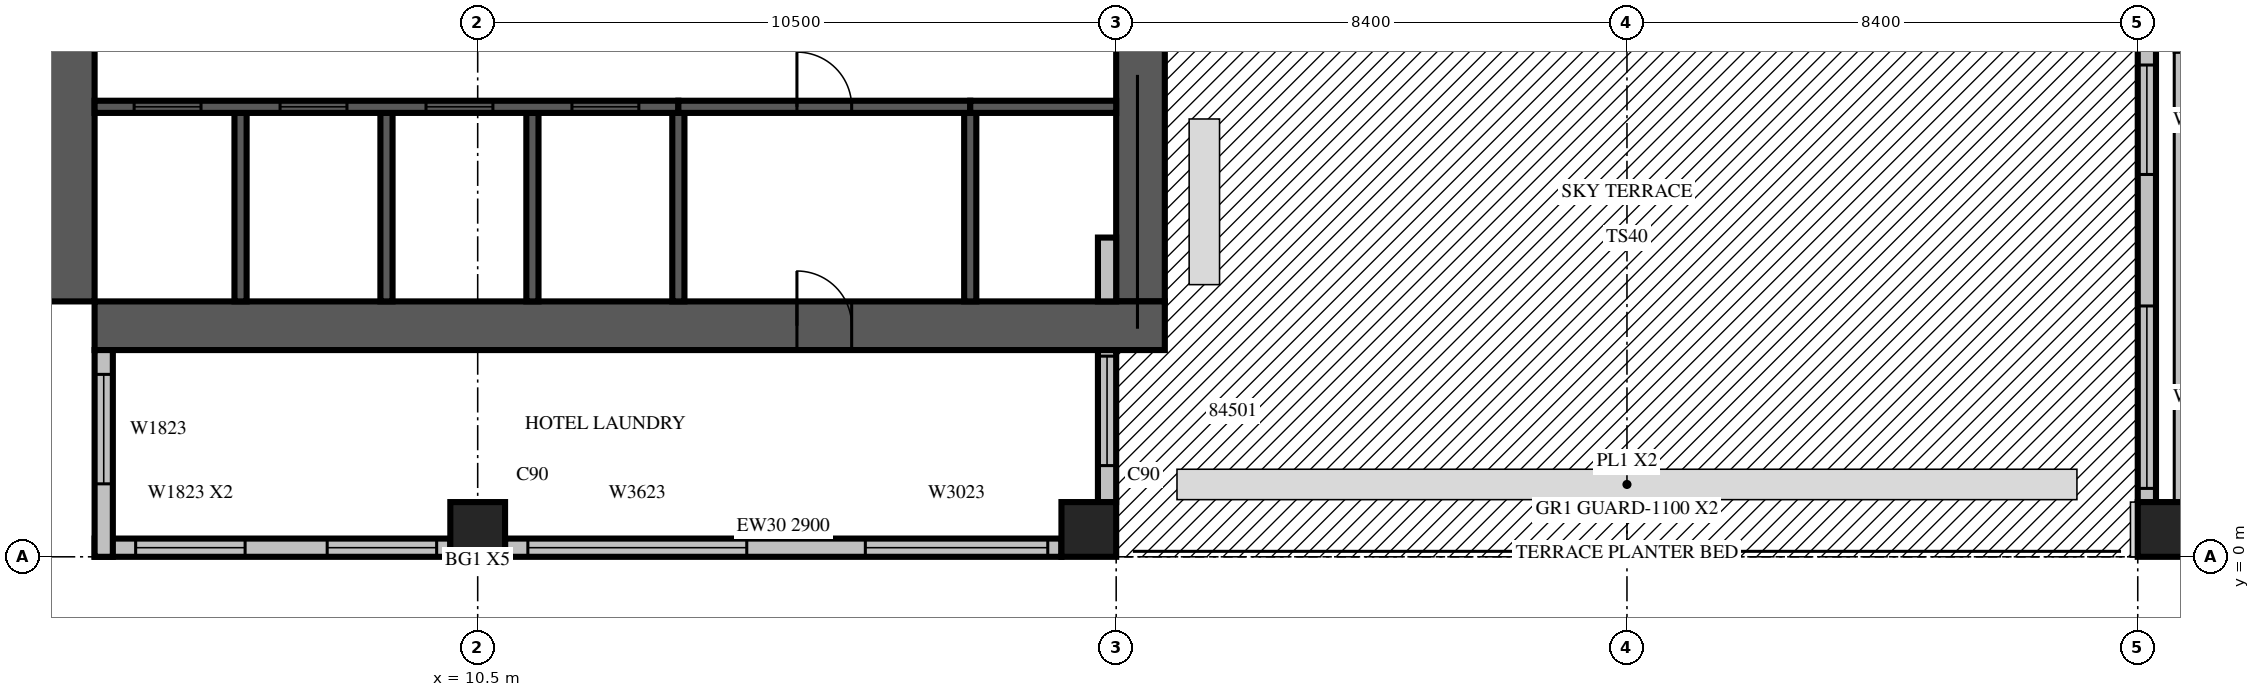
"""IFC4 building model, lengths in metres.
Left out: names, types, materials, properties, quantities, classifications, styles, units other than length and angle.
Written with IfcOpenShell. Run it as: python <this file> out.ifc"""

import sys

from ifc_helpers import new_model, si_unit, direction, frame, frame_2d, origin, origin_2d, place, context, subcontext, project, spatial, rectangle, extrude, source, transform, mapped, element, fill, save


model = new_model("IFC4")
c1 = context("Model", 3, precision=1e-05, world=origin(), true_north=direction((0.0, 1.0)))
c2 = subcontext(c1, "Body", "Model", "MODEL_VIEW")
j1 = project(units=[si_unit("LENGTHUNIT", "METRE"), si_unit("PLANEANGLEUNIT", "RADIAN")], contexts=[c1])
p1 = place(None, origin())
s1 = spatial("IfcSite", under=j1, at=p1, CompositionType="ELEMENT")
p2 = place(p1, origin())
s2 = spatial("IfcBuilding", under=s1, at=p2, CompositionType="ELEMENT")
p3 = place(p2, frame((0.0, 0.0, 204.4)))
s3 = spatial("IfcBuildingStorey", under=s2, at=p3, CompositionType="ELEMENT", Elevation=204.4)
m1 = source(origin(), c2, "Body", "SweptSolid", [
    extrude(rectangle(XDim=0.9, YDim=0.9, at=origin_2d()), origin(), (0.0, 0.0, 1.0), 3.8),
])
for number, where, z_axis, x_axis in (
    (1, (10.5, 0.45, 0.0), (0.0, 0.0, 1.0), (1.0, 0.0, 0.0)),
    (2, (20.55, 0.45, 0.0), (0.0, 0.0, 1.0), (1.0, 0.0, 0.0)),
    (3, (38.25, 0.45, 0.0), (0.0, 0.0, 1.0), (1.0, 0.0, 0.0)),
):
    element("IfcColumn", number, at=place(p3, frame(where, z_axis=z_axis, x_axis=x_axis)), inside=s3, PredefinedType="COLUMN", context=c2, shape_type="MappedRepresentation", body=[
        mapped(m1, transform((0.0, 0.0, 0.0), scale=1.0)),
    ])
m2 = source(origin(), c2, "Body", "SweptSolid", [
    extrude(rectangle(XDim=17.6, YDim=0.8, at=frame_2d((8.8, 0.0))), origin(), (0.0, 0.0, 1.0), 3.8),
])
p4 = place(p3, frame((3.8, 4.2, 0.0), z_axis=(0.0, 0.0, 1.0), x_axis=(0.0, 1.0, 0.0)))
e4 = element("IfcWall", 4, at=p4, inside=s3, PredefinedType="SHEAR", context=c2, shape_type="MappedRepresentation", body=[
    mapped(m2, transform((0.0, 0.0, 0.0), scale=1.0)),
])
m3 = source(origin(), c2, "Body", "SweptSolid", [
    extrude(rectangle(XDim=2.2, YDim=2.1, at=frame_2d((1.1, 1.05))), frame((0.0, 0.41, 0.0), z_axis=(0.0, -1.0, 0.0), x_axis=(1.0, 0.0, 0.0)), (0.0, 0.0, 1.0), 0.82),
])
p5 = place(p4, frame((4.2, 0.0, 0.0)))
e5 = element("IfcOpeningElement", 5, at=p5, cuts=e4, PredefinedType="OPENING", context=c2, shape_type="MappedRepresentation", body=[
    mapped(m3, transform((0.0, 0.0, 0.0), scale=1.0)),
])
m4 = source(origin(), c2, "Body", "SweptSolid", [
    extrude(rectangle(XDim=0.9, YDim=2.1, at=frame_2d((0.45, 1.05))), frame((0.0, 0.41, 0.0), z_axis=(0.0, -1.0, 0.0), x_axis=(1.0, 0.0, 0.0)), (0.0, 0.0, 1.0), 0.82),
])
p6 = place(p4, frame((10.95, 0.0, 0.0)))
e6 = element("IfcOpeningElement", 6, at=p6, cuts=e4, PredefinedType="OPENING", context=c2, shape_type="MappedRepresentation", body=[
    mapped(m4, transform((0.0, 0.0, 0.0), scale=1.0)),
])
m5 = source(origin(), c2, "Body", "SweptSolid", [
    extrude(rectangle(XDim=16.8, YDim=0.8, at=frame_2d((8.4, 0.0))), origin(), (0.0, 0.0, 1.0), 3.8),
])
p7 = place(p3, frame((21.4, 4.2, 0.0), z_axis=(0.0, 0.0, 1.0), x_axis=(0.0, 1.0, 0.0)))
e7 = element("IfcWall", 7, at=p7, inside=s3, PredefinedType="SHEAR", context=c2, shape_type="MappedRepresentation", body=[
    mapped(m5, transform((0.0, 0.0, 0.0), scale=1.0)),
])
p8 = place(p7, frame((4.2, 0.0, 0.0)))
e8 = element("IfcOpeningElement", 8, at=p8, cuts=e7, PredefinedType="OPENING", context=c2, shape_type="MappedRepresentation", body=[
    mapped(m3, transform((0.0, 0.0, 0.0), scale=1.0)),
])
m6 = source(origin(), c2, "Body", "SweptSolid", [
    extrude(rectangle(XDim=1.2, YDim=2.1, at=frame_2d((0.6, 1.05))), frame((0.0, 0.41, 0.0), z_axis=(0.0, -1.0, 0.0), x_axis=(1.0, 0.0, 0.0)), (0.0, 0.0, 1.0), 0.82),
])
p9 = place(p7, frame((14.7, 0.0, 0.0)))
e9 = element("IfcOpeningElement", 9, at=p9, cuts=e7, PredefinedType="OPENING", context=c2, shape_type="MappedRepresentation", body=[
    mapped(m6, transform((0.0, 0.0, 0.0), scale=1.0)),
])
p10 = place(p3, frame((4.2, 3.8, 0.0), z_axis=(0.0, 0.0, 1.0), x_axis=(1.0, 0.0, 0.0)))
e10 = element("IfcWall", 10, at=p10, inside=s3, PredefinedType="SHEAR", context=c2, shape_type="MappedRepresentation", body=[
    mapped(m2, transform((0.0, 0.0, 0.0), scale=1.0)),
])
p11 = place(p10, frame((11.55, 0.0, 0.0)))
e11 = element("IfcOpeningElement", 11, at=p11, cuts=e10, PredefinedType="OPENING", context=c2, shape_type="MappedRepresentation", body=[
    mapped(m4, transform((0.0, 0.0, 0.0), scale=1.0)),
])
m7 = source(origin(), c2, "Body", "SweptSolid", [
    extrude(rectangle(XDim=5.85, YDim=0.3, at=frame_2d((2.925, 0.0))), origin(), (0.0, 0.0, 1.0), 3.4),
])
p12 = place(p3, frame((4.2, 0.15, 0.0), z_axis=(0.0, 0.0, 1.0), x_axis=(1.0, 0.0, 0.0)))
e12 = element("IfcWall", 12, at=p12, inside=s3, PredefinedType="STANDARD", context=c2, shape_type="MappedRepresentation", body=[
    mapped(m7, transform((0.0, 0.0, 0.0), scale=1.0)),
])
m8 = source(origin(), c2, "Body", "SweptSolid", [
    extrude(rectangle(XDim=1.8, YDim=2.3, at=frame_2d((0.9, 1.15))), frame((0.0, 0.16, 0.0), z_axis=(0.0, -1.0, 0.0), x_axis=(1.0, 0.0, 0.0)), (0.0, 0.0, 1.0), 0.32),
])
p13 = place(p12, frame((0.675, 0.0, 0.6)))
e13 = element("IfcOpeningElement", 13, at=p13, cuts=e12, PredefinedType="OPENING", context=c2, shape_type="MappedRepresentation", body=[
    mapped(m8, transform((0.0, 0.0, 0.0), scale=1.0)),
])
p14 = place(p12, frame((3.825, 0.0, 0.6)))
e14 = element("IfcOpeningElement", 14, at=p14, cuts=e12, PredefinedType="OPENING", context=c2, shape_type="MappedRepresentation", body=[
    mapped(m8, transform((0.0, 0.0, 0.0), scale=1.0)),
])
p15 = place(p3, frame((10.95, 0.15, 0.0), z_axis=(0.0, 0.0, 1.0), x_axis=(1.0, 0.0, 0.0)))
e15 = element("IfcWall", 15, at=p15, inside=s3, PredefinedType="STANDARD", context=c2, shape_type="SweptSolid", body=[
    extrude(rectangle(XDim=9.15, YDim=0.3, at=frame_2d((4.575, 0.0))), origin(), (0.0, 0.0, 1.0), 2.9),
])
m9 = source(origin(), c2, "Body", "SweptSolid", [
    extrude(rectangle(XDim=3.6, YDim=2.3, at=frame_2d((1.8, 1.15))), frame((0.0, 0.16, 0.0), z_axis=(0.0, -1.0, 0.0), x_axis=(1.0, 0.0, 0.0)), (0.0, 0.0, 1.0), 0.32),
])
p16 = place(p15, frame((0.375, 0.0, 0.6)))
e16 = element("IfcOpeningElement", 16, at=p16, cuts=e15, PredefinedType="OPENING", context=c2, shape_type="MappedRepresentation", body=[
    mapped(m9, transform((0.0, 0.0, 0.0), scale=1.0)),
])
m10 = source(origin(), c2, "Body", "SweptSolid", [
    extrude(rectangle(XDim=3.0, YDim=2.3, at=frame_2d((1.5, 1.15))), frame((0.0, 0.16, 0.0), z_axis=(0.0, -1.0, 0.0), x_axis=(1.0, 0.0, 0.0)), (0.0, 0.0, 1.0), 0.32),
])
p17 = place(p15, frame((5.925, 0.0, 0.6)))
e17 = element("IfcOpeningElement", 17, at=p17, cuts=e15, PredefinedType="OPENING", context=c2, shape_type="MappedRepresentation", body=[
    mapped(m10, transform((0.0, 0.0, 0.0), scale=1.0)),
])
m11 = source(origin(), c2, "Body", "SweptSolid", [
    extrude(rectangle(XDim=2.5, YDim=0.3, at=frame_2d((1.25, 0.0))), origin(), (0.0, 0.0, 1.0), 3.4),
])
p18 = place(p3, frame((20.85, 0.9, 0.0), z_axis=(0.0, 0.0, 1.0), x_axis=(0.0, 1.0, 0.0)))
e18 = element("IfcWall", 18, at=p18, inside=s3, PredefinedType="STANDARD", context=c2, shape_type="MappedRepresentation", body=[
    mapped(m11, transform((0.0, 0.0, 0.0), scale=1.0)),
])
m12 = source(origin(), c2, "Body", "SweptSolid", [
    extrude(rectangle(XDim=1.8, YDim=2.4, at=frame_2d((0.9, 1.2))), frame((0.0, 0.16, 0.0), z_axis=(0.0, -1.0, 0.0), x_axis=(1.0, 0.0, 0.0)), (0.0, 0.0, 1.0), 0.32),
])
p19 = place(p18, frame((0.6, 0.0, 0.0)))
e19 = element("IfcOpeningElement", 19, at=p19, cuts=e18, PredefinedType="OPENING", context=c2, shape_type="MappedRepresentation", body=[
    mapped(m12, transform((0.0, 0.0, 0.0), scale=1.0)),
])
p20 = place(p3, frame((20.85, 4.2, 0.0), z_axis=(0.0, 0.0, 1.0), x_axis=(0.0, 1.0, 0.0)))
e20 = element("IfcWall", 20, at=p20, inside=s3, PredefinedType="STANDARD", context=c2, shape_type="SweptSolid", body=[
    extrude(rectangle(XDim=1.05, YDim=0.3, at=frame_2d((0.525, 0.0))), origin(), (0.0, 0.0, 1.0), 3.4),
])
m13 = source(origin(), c2, "Body", "SweptSolid", [
    extrude(rectangle(XDim=9.15, YDim=0.3, at=frame_2d((4.575, 0.0))), origin(), (0.0, 0.0, 1.0), 3.4),
])
p21 = place(p3, frame((37.95, 10.05, 0.0), z_axis=(0.0, 0.0, 1.0), x_axis=(0.0, -1.0, 0.0)))
e21 = element("IfcWall", 21, at=p21, inside=s3, PredefinedType="STANDARD", context=c2, shape_type="MappedRepresentation", body=[
    mapped(m13, transform((0.0, 0.0, 0.0), scale=1.0)),
])
p22 = place(p21, frame((1.962, 0.0, 0.6)))
e22 = element("IfcOpeningElement", 22, at=p22, cuts=e21, PredefinedType="OPENING", context=c2, shape_type="MappedRepresentation", body=[
    mapped(m8, transform((0.0, 0.0, 0.0), scale=1.0)),
])
p23 = place(p21, frame((5.925, 0.0, 0.6)))
e23 = element("IfcOpeningElement", 23, at=p23, cuts=e21, PredefinedType="OPENING", context=c2, shape_type="MappedRepresentation", body=[
    mapped(m10, transform((0.0, 0.0, 0.0), scale=1.0)),
])
m14 = source(origin(), c2, "Body", "SweptSolid", [
    extrude(rectangle(XDim=3.4, YDim=0.3, at=frame_2d((1.7, 0.0))), origin(), (0.0, 0.0, 1.0), 3.4),
])
p24 = place(p3, frame((4.35, 3.4, 0.0), z_axis=(0.0, 0.0, 1.0), x_axis=(0.0, -1.0, 0.0)))
e24 = element("IfcWall", 24, at=p24, inside=s3, PredefinedType="STANDARD", context=c2, shape_type="MappedRepresentation", body=[
    mapped(m14, transform((0.0, 0.0, 0.0), scale=1.0)),
])
p25 = place(p24, frame((0.4, 0.0, 0.6)))
e25 = element("IfcOpeningElement", 25, at=p25, cuts=e24, PredefinedType="OPENING", context=c2, shape_type="MappedRepresentation", body=[
    mapped(m8, transform((0.0, 0.0, 0.0), scale=1.0)),
])
m15 = source(origin(), c2, "Body", "SweptSolid", [
    extrude(rectangle(XDim=3.1, YDim=0.2, at=frame_2d((1.55, 0.0))), origin(), (0.0, 0.0, 1.0), 3.8),
])
for number, where, z_axis, x_axis in (
    (26, (6.6, 4.2, 0.0), (0.0, 0.0, 1.0), (0.0, 1.0, 0.0)),
    (27, (9.0, 4.2, 0.0), (0.0, 0.0, 1.0), (0.0, 1.0, 0.0)),
    (28, (11.4, 4.2, 0.0), (0.0, 0.0, 1.0), (0.0, 1.0, 0.0)),
):
    element("IfcWall", number, at=place(p3, frame(where, z_axis=z_axis, x_axis=x_axis)), inside=s3, PredefinedType="SOLIDWALL", context=c2, shape_type="MappedRepresentation", body=[
        mapped(m15, transform((0.0, 0.0, 0.0), scale=1.0)),
    ])
m16 = source(origin(), c2, "Body", "SweptSolid", [
    extrude(rectangle(XDim=3.1, YDim=0.2, at=frame_2d((1.55, 0.0))), origin(), (0.0, 0.0, 1.0), 3.4),
])
for number, where, z_axis, x_axis in (
    (29, (13.8, 4.2, 0.0), (0.0, 0.0, 1.0), (0.0, 1.0, 0.0)),
    (30, (18.6, 4.2, 0.0), (0.0, 0.0, 1.0), (0.0, 1.0, 0.0)),
):
    element("IfcWall", number, at=place(p3, frame(where, z_axis=z_axis, x_axis=x_axis)), inside=s3, PredefinedType="SOLIDWALL", context=c2, shape_type="MappedRepresentation", body=[
        mapped(m16, transform((0.0, 0.0, 0.0), scale=1.0)),
    ])
m17 = source(origin(), c2, "Body", "SweptSolid", [
    extrude(rectangle(XDim=9.6, YDim=0.2, at=frame_2d((4.8, 0.0))), origin(), (0.0, 0.0, 1.0), 3.8),
])
p26 = place(p3, frame((4.2, 7.4, 0.0), z_axis=(0.0, 0.0, 1.0), x_axis=(1.0, 0.0, 0.0)))
e31 = element("IfcWall", 31, at=p26, inside=s3, PredefinedType="SOLIDWALL", context=c2, shape_type="MappedRepresentation", body=[
    mapped(m17, transform((0.0, 0.0, 0.0), scale=1.0)),
])
m18 = source(origin(), c2, "Body", "SweptSolid", [
    extrude(rectangle(XDim=1.1, YDim=2.1, at=frame_2d((0.55, 1.05))), frame((0.0, 0.11, 0.0), z_axis=(0.0, -1.0, 0.0), x_axis=(1.0, 0.0, 0.0)), (0.0, 0.0, 1.0), 0.22),
])
p27 = place(p26, frame((0.65, 0.0, 0.0)))
e32 = element("IfcOpeningElement", 32, at=p27, cuts=e31, PredefinedType="OPENING", context=c2, shape_type="MappedRepresentation", body=[
    mapped(m18, transform((0.0, 0.0, 0.0), scale=1.0)),
])
p28 = place(p26, frame((3.05, 0.0, 0.0)))
e33 = element("IfcOpeningElement", 33, at=p28, cuts=e31, PredefinedType="OPENING", context=c2, shape_type="MappedRepresentation", body=[
    mapped(m18, transform((0.0, 0.0, 0.0), scale=1.0)),
])
p29 = place(p26, frame((5.45, 0.0, 0.0)))
e34 = element("IfcOpeningElement", 34, at=p29, cuts=e31, PredefinedType="OPENING", context=c2, shape_type="MappedRepresentation", body=[
    mapped(m18, transform((0.0, 0.0, 0.0), scale=1.0)),
])
p30 = place(p26, frame((7.85, 0.0, 0.0)))
e35 = element("IfcOpeningElement", 35, at=p30, cuts=e31, PredefinedType="OPENING", context=c2, shape_type="MappedRepresentation", body=[
    mapped(m18, transform((0.0, 0.0, 0.0), scale=1.0)),
])
m19 = source(origin(), c2, "Body", "SweptSolid", [
    extrude(rectangle(XDim=4.8, YDim=0.2, at=frame_2d((2.4, 0.0))), origin(), (0.0, 0.0, 1.0), 3.4),
])
p31 = place(p3, frame((13.8, 7.4, 0.0), z_axis=(0.0, 0.0, 1.0), x_axis=(1.0, 0.0, 0.0)))
e36 = element("IfcWall", 36, at=p31, inside=s3, PredefinedType="SOLIDWALL", context=c2, shape_type="MappedRepresentation", body=[
    mapped(m19, transform((0.0, 0.0, 0.0), scale=1.0)),
])
m20 = source(origin(), c2, "Body", "SweptSolid", [
    extrude(rectangle(XDim=0.9, YDim=2.1, at=frame_2d((0.45, 1.05))), frame((0.0, 0.11, 0.0), z_axis=(0.0, -1.0, 0.0), x_axis=(1.0, 0.0, 0.0)), (0.0, 0.0, 1.0), 0.22),
])
p32 = place(p31, frame((1.95, 0.0, 0.0)))
e37 = element("IfcOpeningElement", 37, at=p32, cuts=e36, PredefinedType="OPENING", context=c2, shape_type="MappedRepresentation", body=[
    mapped(m20, transform((0.0, 0.0, 0.0), scale=1.0)),
])
m21 = source(origin(), c2, "Body", "SweptSolid", [
    extrude(rectangle(XDim=2.4, YDim=0.2, at=frame_2d((1.2, 0.0))), origin(), (0.0, 0.0, 1.0), 3.8),
])
p33 = place(p3, frame((18.6, 7.4, 0.0), z_axis=(0.0, 0.0, 1.0), x_axis=(1.0, 0.0, 0.0)))
e38 = element("IfcWall", 38, at=p33, inside=s3, PredefinedType="SOLIDWALL", context=c2, shape_type="MappedRepresentation", body=[
    mapped(m21, transform((0.0, 0.0, 0.0), scale=1.0)),
])
m22 = source(origin(), c2, "Body", "SweptSolid", [
    extrude(rectangle(XDim=8.0, YDim=0.2, at=frame_2d((4.0, 0.0))), origin(), (0.0, 0.0, 1.0), 3.4),
])
p34 = place(p3, frame((38.5, 0.3, 0.0), z_axis=(0.0, 0.0, 1.0), x_axis=(0.0, 1.0, 0.0)))
e39 = element("IfcWall", 39, at=p34, inside=s3, PredefinedType="PARTITIONING", context=c2, shape_type="MappedRepresentation", body=[
    mapped(m22, transform((0.0, 0.0, 0.0), scale=1.0)),
])
m23 = source(origin(), c2, "Body", "SweptSolid", [
    extrude(rectangle(XDim=1.8, YDim=2.3, at=frame_2d((0.9, 1.15))), frame((0.0, 0.03, 0.0), z_axis=(0.0, -1.0, 0.0), x_axis=(1.0, 0.0, 0.0)), (0.0, 0.0, 1.0), 0.06),
])
p35 = place(p13, origin())
e40 = element("IfcWindow", 40, at=p35, inside=s3, PartitioningType="SINGLE_PANEL", PredefinedType="WINDOW", context=c2, shape_type="MappedRepresentation", body=[
    mapped(m23, transform((0.0, 0.0, 0.0), scale=1.0)),
])
fill(e13, e40)
p36 = place(p14, origin())
e41 = element("IfcWindow", 41, at=p36, inside=s3, PartitioningType="SINGLE_PANEL", PredefinedType="WINDOW", context=c2, shape_type="MappedRepresentation", body=[
    mapped(m23, transform((0.0, 0.0, 0.0), scale=1.0)),
])
fill(e14, e41)
m24 = source(origin(), c2, "Body", "SweptSolid", [
    extrude(rectangle(XDim=3.6, YDim=2.3, at=frame_2d((1.8, 1.15))), frame((0.0, 0.03, 0.0), z_axis=(0.0, -1.0, 0.0), x_axis=(1.0, 0.0, 0.0)), (0.0, 0.0, 1.0), 0.06),
])
p37 = place(p16, origin())
e42 = element("IfcWindow", 42, at=p37, inside=s3, PartitioningType="SINGLE_PANEL", PredefinedType="WINDOW", context=c2, shape_type="MappedRepresentation", body=[
    mapped(m24, transform((0.0, 0.0, 0.0), scale=1.0)),
])
fill(e16, e42)
m25 = source(origin(), c2, "Body", "SweptSolid", [
    extrude(rectangle(XDim=3.0, YDim=2.3, at=frame_2d((1.5, 1.15))), frame((0.0, 0.03, 0.0), z_axis=(0.0, -1.0, 0.0), x_axis=(1.0, 0.0, 0.0)), (0.0, 0.0, 1.0), 0.06),
])
p38 = place(p17, origin())
e43 = element("IfcWindow", 43, at=p38, inside=s3, PartitioningType="SINGLE_PANEL", PredefinedType="WINDOW", context=c2, shape_type="MappedRepresentation", body=[
    mapped(m25, transform((0.0, 0.0, 0.0), scale=1.0)),
])
fill(e17, e43)
m26 = source(origin(), c2, "Body", "SweptSolid", [
    extrude(rectangle(XDim=1.8, YDim=2.4, at=frame_2d((0.9, 1.2))), frame((0.0, 0.025, 0.0), z_axis=(0.0, -1.0, 0.0), x_axis=(1.0, 0.0, 0.0)), (0.0, 0.0, 1.0), 0.05),
])
p39 = place(p19, origin())
e44 = element("IfcDoor", 44, at=p39, inside=s3, OperationType="SLIDING_TO_LEFT", PredefinedType="DOOR", context=c2, shape_type="MappedRepresentation", body=[
    mapped(m26, transform((0.0, 0.0, 0.0), scale=1.0)),
])
fill(e19, e44)
p40 = place(p22, origin())
e45 = element("IfcWindow", 45, at=p40, inside=s3, PartitioningType="SINGLE_PANEL", PredefinedType="WINDOW", context=c2, shape_type="MappedRepresentation", body=[
    mapped(m23, transform((0.0, 0.0, 0.0), scale=1.0)),
])
fill(e22, e45)
p41 = place(p23, origin())
e46 = element("IfcWindow", 46, at=p41, inside=s3, PartitioningType="SINGLE_PANEL", PredefinedType="WINDOW", context=c2, shape_type="MappedRepresentation", body=[
    mapped(m25, transform((0.0, 0.0, 0.0), scale=1.0)),
])
fill(e23, e46)
p42 = place(p25, origin())
e47 = element("IfcWindow", 47, at=p42, inside=s3, PartitioningType="SINGLE_PANEL", PredefinedType="WINDOW", context=c2, shape_type="MappedRepresentation", body=[
    mapped(m23, transform((0.0, 0.0, 0.0), scale=1.0)),
])
fill(e25, e47)
m27 = source(origin(), c2, "Body", "SweptSolid", [
    extrude(rectangle(XDim=1.1, YDim=2.1, at=frame_2d((0.55, 1.05))), frame((0.0, 0.025, 0.0), z_axis=(0.0, -1.0, 0.0), x_axis=(1.0, 0.0, 0.0)), (0.0, 0.0, 1.0), 0.05),
])
p43 = place(p27, origin())
e48 = element("IfcDoor", 48, at=p43, inside=s3, OperationType="SLIDING_TO_LEFT", PredefinedType="DOOR", context=c2, shape_type="MappedRepresentation", body=[
    mapped(m27, transform((0.0, 0.0, 0.0), scale=1.0)),
])
fill(e32, e48)
p44 = place(p28, origin())
e49 = element("IfcDoor", 49, at=p44, inside=s3, OperationType="SLIDING_TO_LEFT", PredefinedType="DOOR", context=c2, shape_type="MappedRepresentation", body=[
    mapped(m27, transform((0.0, 0.0, 0.0), scale=1.0)),
])
fill(e33, e49)
p45 = place(p29, origin())
e50 = element("IfcDoor", 50, at=p45, inside=s3, OperationType="SLIDING_TO_LEFT", PredefinedType="DOOR", context=c2, shape_type="MappedRepresentation", body=[
    mapped(m27, transform((0.0, 0.0, 0.0), scale=1.0)),
])
fill(e34, e50)
p46 = place(p30, origin())
e51 = element("IfcDoor", 51, at=p46, inside=s3, OperationType="SLIDING_TO_LEFT", PredefinedType="DOOR", context=c2, shape_type="MappedRepresentation", body=[
    mapped(m27, transform((0.0, 0.0, 0.0), scale=1.0)),
])
fill(e35, e51)
m28 = source(origin(), c2, "Body", "SweptSolid", [
    extrude(rectangle(XDim=0.9, YDim=2.1, at=frame_2d((0.45, 1.05))), frame((0.0, 0.025, 0.0), z_axis=(0.0, -1.0, 0.0), x_axis=(1.0, 0.0, 0.0)), (0.0, 0.0, 1.0), 0.05),
])
p47 = place(p32, origin())
e52 = element("IfcDoor", 52, at=p47, inside=s3, OperationType="SINGLE_SWING_LEFT", PredefinedType="DOOR", context=c2, shape_type="MappedRepresentation", body=[
    mapped(m28, transform((0.0, 0.0, 0.0), scale=1.0)),
])
fill(e37, e52)
p48 = place(p11, origin())
e53 = element("IfcDoor", 53, at=p48, inside=s3, OperationType="SINGLE_SWING_LEFT", PredefinedType="DOOR", context=c2, shape_type="MappedRepresentation", body=[
    mapped(m28, transform((0.0, 0.0, 0.0), scale=1.0)),
])
fill(e11, e53)
save(model, sys.argv[1])
